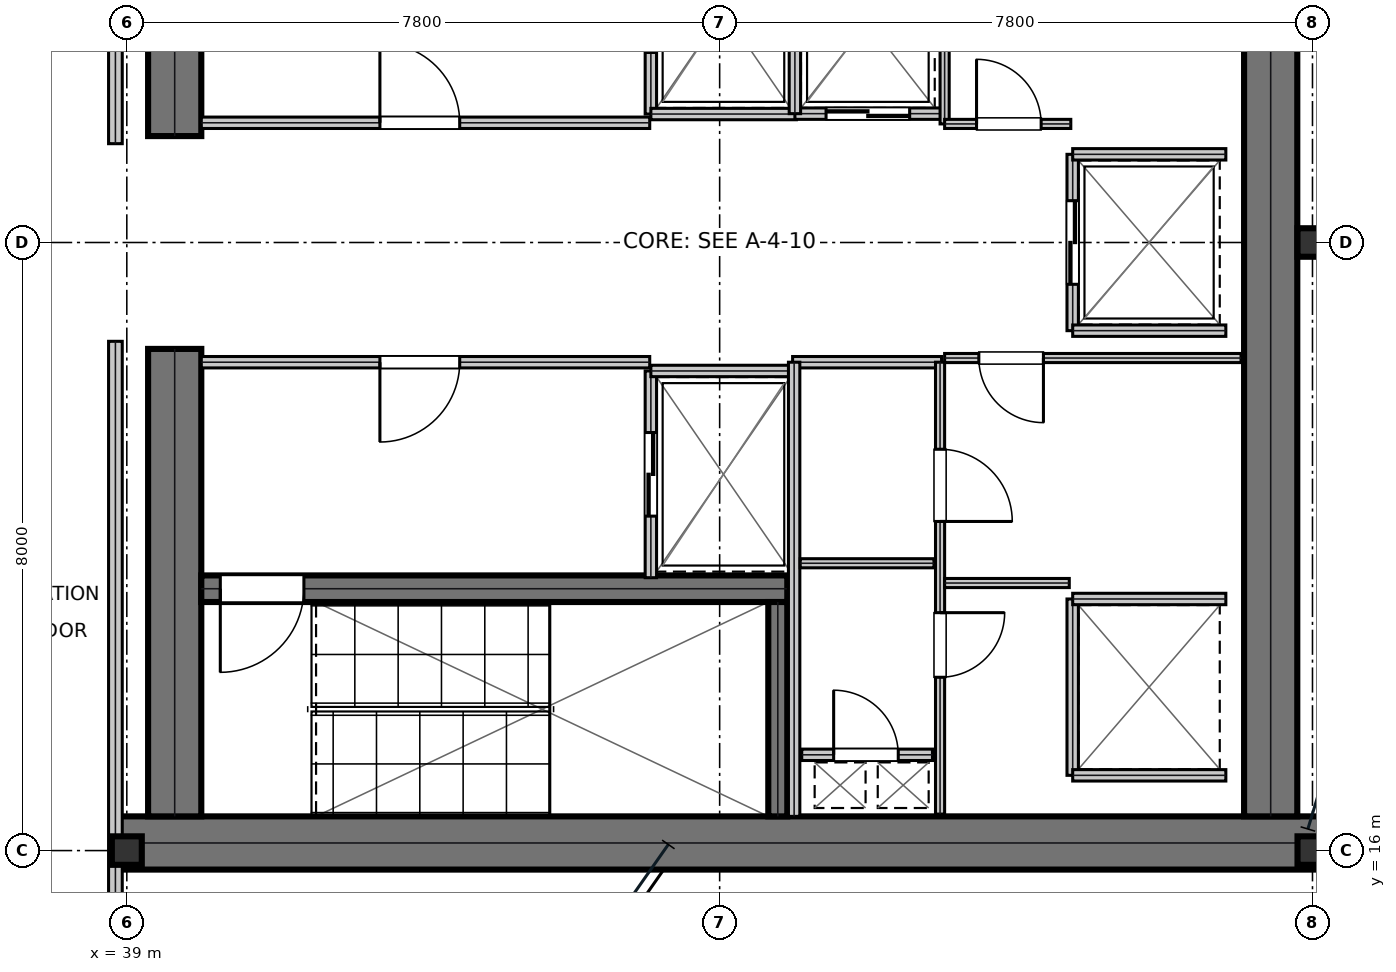
"""IFC4 building model, lengths in metres.
Left out: names, types, materials, properties, quantities, classifications, styles, units other than length and angle.
Written with IfcOpenShell. Run it as: python <this file> out.ifc"""

import sys

from ifc_helpers import new_model, si_unit, direction, frame, frame_2d, origin, origin_2d, place, context, subcontext, project, spatial, rectangle, i_section, extrude, element, fill, save


model = new_model("IFC4")
c1 = context("Model", 3, precision=1e-05, world=origin(), true_north=direction((0.0, 1.0)))
c2 = subcontext(c1, "Body", "Model", "MODEL_VIEW")
j1 = project(units=[si_unit("LENGTHUNIT", "METRE"), si_unit("PLANEANGLEUNIT", "RADIAN")], contexts=[c1])
p1 = place(None, origin())
s1 = spatial("IfcSite", under=j1, at=p1, CompositionType="ELEMENT")
p2 = place(p1, origin())
s2 = spatial("IfcBuilding", under=s1, at=p2, CompositionType="ELEMENT")
p3 = place(p2, frame((0.0, 0.0, 224.25)))
s3 = spatial("IfcBuildingStorey", under=s2, at=p3, CompositionType="ELEMENT", Elevation=224.25)
p4 = place(p3, frame((38.8, 16.1, 0.0), z_axis=(0.0, 0.0, 1.0), x_axis=(1.0, 0.0, 0.0)))
e1 = element("IfcWall", 1, at=p4, inside=s3, PredefinedType="SHEAR", context=c2, shape_type="SweptSolid", body=[
    extrude(rectangle(XDim=16.0, YDim=0.7, at=frame_2d((8.0, 0.0))), origin(), (0.0, 0.0, 1.0), 3.79),
])
for number, where, z_axis, x_axis in (
    (2, (39.63, 16.45, 0.0), (0.0, 0.0, 1.0), (0.0, 1.0, 0.0)),
    (3, (39.63, 25.4, 0.0), (0.0, 0.0, 1.0), (0.0, 1.0, 0.0)),
):
    element("IfcWall", number, at=place(p3, frame(where, z_axis=z_axis, x_axis=x_axis)), inside=s3, PredefinedType="SHEAR", context=c2, shape_type="SweptSolid", body=[
        extrude(rectangle(XDim=6.15, YDim=0.7, at=frame_2d((3.075, 0.0))), origin(), (0.0, 0.0, 1.0), 3.79),
    ])
p5 = place(p3, frame((54.05, 16.45, 0.0), z_axis=(0.0, 0.0, 1.0), x_axis=(0.0, 1.0, 0.0)))
e4 = element("IfcWall", 4, at=p5, inside=s3, PredefinedType="SHEAR", context=c2, shape_type="SweptSolid", body=[
    extrude(rectangle(XDim=15.1, YDim=0.7, at=frame_2d((7.55, 0.0))), origin(), (0.0, 0.0, 1.0), 3.79),
])
p6 = place(p3, frame((39.98, 19.445, 0.0), z_axis=(0.0, 0.0, 1.0), x_axis=(1.0, 0.0, 0.0)))
e5 = element("IfcWall", 5, at=p6, inside=s3, PredefinedType="SHEAR", context=c2, shape_type="SweptSolid", body=[
    extrude(rectangle(XDim=7.71, YDim=0.35, at=frame_2d((3.855, 0.0))), origin(), (0.0, 0.0, 1.0), 3.79),
])
p7 = place(p6, frame((0.25, 0.0, 0.0)))
e6 = element("IfcOpeningElement", 6, at=p7, cuts=e5, PredefinedType="OPENING", context=c2, shape_type="SweptSolid", body=[
    extrude(rectangle(XDim=1.1, YDim=2.15, at=frame_2d((0.55, 1.075))), frame((0.0, 0.185, 0.0), z_axis=(0.0, -1.0, 0.0), x_axis=(1.0, 0.0, 0.0)), (0.0, 0.0, 1.0), 0.37),
])
p8 = place(p3, frame((47.565, 16.45, 0.0), z_axis=(0.0, 0.0, 1.0), x_axis=(0.0, 1.0, 0.0)))
e7 = element("IfcWall", 7, at=p8, inside=s3, PredefinedType="SHEAR", context=c2, shape_type="SweptSolid", body=[
    extrude(rectangle(XDim=2.82, YDim=0.25, at=frame_2d((1.41, 0.0))), origin(), (0.0, 0.0, 1.0), 3.79),
])
for number, where, z_axis, x_axis in (
    (8, (39.0, 16.0, 0.0), (0.0, 0.0, 1.0), (1.0, 0.0, 0.0)),
    (9, (54.6, 16.0, 0.0), (0.0, 0.0, 1.0), (1.0, 0.0, 0.0)),
    (10, (54.6, 24.0, 0.0), (0.0, 0.0, 1.0), (1.0, 0.0, 0.0)),
):
    element("IfcColumn", number, at=place(p3, frame(where, z_axis=z_axis, x_axis=x_axis)), inside=s3, PredefinedType="COLUMN", context=c2, shape_type="SweptSolid", body=[
        extrude(i_section(OverallWidth=0.394, OverallDepth=0.375, WebThickness=0.017, FlangeThickness=0.028, at=origin_2d()), origin(), (0.0, 0.0, 1.0), 4.044),
    ])
p9 = place(p3, frame((39.98, 25.575, 0.0), z_axis=(0.0, 0.0, 1.0), x_axis=(1.0, 0.0, 0.0)))
e11 = element("IfcWall", 11, at=p9, inside=s3, PredefinedType="PARTITIONING", context=c2, shape_type="SweptSolid", body=[
    extrude(rectangle(XDim=5.9, YDim=0.15, at=frame_2d((2.95, 0.0))), origin(), (0.0, 0.0, 1.0), 3.79),
])
p10 = place(p9, frame((2.35, 0.0, 0.0)))
e12 = element("IfcOpeningElement", 12, at=p10, cuts=e11, PredefinedType="OPENING", context=c2, shape_type="SweptSolid", body=[
    extrude(rectangle(XDim=1.05, YDim=2.15, at=frame_2d((0.525, 1.075))), frame((0.0, 0.085, 0.0), z_axis=(0.0, -1.0, 0.0), x_axis=(1.0, 0.0, 0.0)), (0.0, 0.0, 1.0), 0.17),
])
p11 = place(p3, frame((39.98, 22.425, 0.0), z_axis=(0.0, 0.0, 1.0), x_axis=(1.0, 0.0, 0.0)))
e13 = element("IfcWall", 13, at=p11, inside=s3, PredefinedType="PARTITIONING", context=c2, shape_type="SweptSolid", body=[
    extrude(rectangle(XDim=5.9, YDim=0.15, at=frame_2d((2.95, 0.0))), origin(), (0.0, 0.0, 1.0), 3.79),
])
p12 = place(p11, frame((2.35, 0.0, 0.0)))
e14 = element("IfcOpeningElement", 14, at=p12, cuts=e13, PredefinedType="OPENING", context=c2, shape_type="SweptSolid", body=[
    extrude(rectangle(XDim=1.05, YDim=2.15, at=frame_2d((0.525, 1.075))), frame((0.0, 0.085, 0.0), z_axis=(0.0, -1.0, 0.0), x_axis=(1.0, 0.0, 0.0)), (0.0, 0.0, 1.0), 0.17),
])
p13 = place(p3, frame((45.895, 25.69, 0.0), z_axis=(0.0, 0.0, 1.0), x_axis=(0.0, 1.0, 0.0)))
e15 = element("IfcWall", 15, at=p13, inside=s3, PredefinedType="PARTITIONING", context=c2, shape_type="SweptSolid", body=[
    extrude(rectangle(XDim=2.72, YDim=0.15, at=frame_2d((1.36, 0.0))), origin(), (0.0, 0.0, 1.0), 3.79),
])
p14 = place(p13, frame((0.81, 0.0, 0.0)))
e16 = element("IfcOpeningElement", 16, at=p14, cuts=e15, PredefinedType="OPENING", context=c2, shape_type="SweptSolid", body=[
    extrude(rectangle(XDim=1.1, YDim=2.15, at=frame_2d((0.55, 1.075))), frame((0.0, 0.085, 0.0), z_axis=(0.0, -1.0, 0.0), x_axis=(1.0, 0.0, 0.0)), (0.0, 0.0, 1.0), 0.17),
])
p15 = place(p3, frame((45.895, 25.69, 0.0), z_axis=(0.0, 0.0, 1.0), x_axis=(1.0, 0.0, 0.0)))
e17 = element("IfcWall", 17, at=p15, inside=s3, PredefinedType="PARTITIONING", context=c2, shape_type="SweptSolid", body=[
    extrude(rectangle(XDim=1.915, YDim=0.15, at=frame_2d((0.958, 0.0))), origin(), (0.0, 0.0, 1.0), 3.79),
])
p16 = place(p3, frame((45.895, 19.59, 0.0), z_axis=(0.0, 0.0, 1.0), x_axis=(0.0, 1.0, 0.0)))
e18 = element("IfcWall", 18, at=p16, inside=s3, PredefinedType="PARTITIONING", context=c2, shape_type="SweptSolid", body=[
    extrude(rectangle(XDim=2.72, YDim=0.15, at=frame_2d((1.36, 0.0))), origin(), (0.0, 0.0, 1.0), 3.79),
])
p17 = place(p16, frame((0.81, 0.0, 0.0)))
e19 = element("IfcOpeningElement", 19, at=p17, cuts=e18, PredefinedType="OPENING", context=c2, shape_type="SweptSolid", body=[
    extrude(rectangle(XDim=1.1, YDim=2.15, at=frame_2d((0.55, 1.075))), frame((0.0, 0.085, 0.0), z_axis=(0.0, -1.0, 0.0), x_axis=(1.0, 0.0, 0.0)), (0.0, 0.0, 1.0), 0.17),
])
p18 = place(p3, frame((45.895, 22.31, 0.0), z_axis=(0.0, 0.0, 1.0), x_axis=(1.0, 0.0, 0.0)))
e20 = element("IfcWall", 20, at=p18, inside=s3, PredefinedType="PARTITIONING", context=c2, shape_type="SweptSolid", body=[
    extrude(rectangle(XDim=1.915, YDim=0.15, at=frame_2d((0.958, 0.0))), origin(), (0.0, 0.0, 1.0), 3.79),
])
p19 = place(p3, frame((47.79, 25.695, 0.0), z_axis=(0.0, 0.0, 1.0), x_axis=(1.0, 0.0, 0.0)))
e21 = element("IfcWall", 21, at=p19, inside=s3, PredefinedType="PARTITIONING", context=c2, shape_type="SweptSolid", body=[
    extrude(rectangle(XDim=1.92, YDim=0.15, at=frame_2d((0.96, 0.0))), origin(), (0.0, 0.0, 1.0), 3.79),
])
p20 = place(p19, frame((0.41, 0.0, 0.0)))
e22 = element("IfcOpeningElement", 22, at=p20, cuts=e21, PredefinedType="OPENING", context=c2, shape_type="SweptSolid", body=[
    extrude(rectangle(XDim=1.1, YDim=2.15, at=frame_2d((0.55, 1.075))), frame((0.0, 0.085, 0.0), z_axis=(0.0, -1.0, 0.0), x_axis=(1.0, 0.0, 0.0)), (0.0, 0.0, 1.0), 0.17),
])
p21 = place(p3, frame((47.79, 25.695, 0.0), z_axis=(0.0, 0.0, 1.0), x_axis=(0.0, 1.0, 0.0)))
e23 = element("IfcWall", 23, at=p21, inside=s3, PredefinedType="PARTITIONING", context=c2, shape_type="SweptSolid", body=[
    extrude(rectangle(XDim=2.415, YDim=0.15, at=frame_2d((1.208, 0.0))), origin(), (0.0, 0.0, 1.0), 3.79),
])
p22 = place(p3, frame((51.445, 22.84, 0.0), z_axis=(0.0, 0.0, 1.0), x_axis=(0.0, 1.0, 0.0)))
e24 = element("IfcWall", 24, at=p22, inside=s3, PredefinedType="PARTITIONING", context=c2, shape_type="SweptSolid", body=[
    extrude(rectangle(XDim=2.32, YDim=0.15, at=frame_2d((1.16, 0.0))), origin(), (0.0, 0.0, 1.0), 3.79),
])
p23 = place(p22, frame((0.61, 0.0, 0.0)))
e25 = element("IfcOpeningElement", 25, at=p23, cuts=e24, PredefinedType="OPENING", context=c2, shape_type="SweptSolid", body=[
    extrude(rectangle(XDim=1.1, YDim=2.15, at=frame_2d((0.55, 1.075))), frame((0.0, 0.085, 0.0), z_axis=(0.0, -1.0, 0.0), x_axis=(1.0, 0.0, 0.0)), (0.0, 0.0, 1.0), 0.17),
])
for number, where, z_axis, x_axis in (
    (26, (51.445, 22.84, 0.0), (0.0, 0.0, 1.0), (1.0, 0.0, 0.0)),
    (27, (51.445, 25.16, 0.0), (0.0, 0.0, 1.0), (1.0, 0.0, 0.0)),
):
    element("IfcWall", number, at=place(p3, frame(where, z_axis=z_axis, x_axis=x_axis)), inside=s3, PredefinedType="PARTITIONING", context=c2, shape_type="SweptSolid", body=[
        extrude(rectangle(XDim=2.015, YDim=0.15, at=frame_2d((1.007, 0.0))), origin(), (0.0, 0.0, 1.0), 3.79),
    ])
p24 = place(p3, frame((51.445, 16.99, 0.0), z_axis=(0.0, 0.0, 1.0), x_axis=(0.0, 1.0, 0.0)))
e28 = element("IfcWall", 28, at=p24, inside=s3, PredefinedType="PARTITIONING", context=c2, shape_type="SweptSolid", body=[
    extrude(rectangle(XDim=2.32, YDim=0.15, at=frame_2d((1.16, 0.0))), origin(), (0.0, 0.0, 1.0), 3.79),
])
for number, where, z_axis, x_axis in (
    (29, (51.445, 16.99, 0.0), (0.0, 0.0, 1.0), (1.0, 0.0, 0.0)),
    (30, (51.445, 19.31, 0.0), (0.0, 0.0, 1.0), (1.0, 0.0, 0.0)),
):
    element("IfcWall", number, at=place(p3, frame(where, z_axis=z_axis, x_axis=x_axis)), inside=s3, PredefinedType="PARTITIONING", context=c2, shape_type="SweptSolid", body=[
        extrude(rectangle(XDim=2.015, YDim=0.15, at=frame_2d((1.007, 0.0))), origin(), (0.0, 0.0, 1.0), 3.79),
    ])
p25 = place(p3, frame((47.88, 17.26, 0.0), z_axis=(0.0, 0.0, 1.0), x_axis=(1.0, 0.0, 0.0)))
e31 = element("IfcWall", 31, at=p25, inside=s3, PredefinedType="PARTITIONING", context=c2, shape_type="SweptSolid", body=[
    extrude(rectangle(XDim=1.72, YDim=0.15, at=frame_2d((0.86, 0.0))), origin(), (0.0, 0.0, 1.0), 3.79),
])
p26 = place(p25, frame((0.42, 0.0, 0.0)))
e32 = element("IfcOpeningElement", 32, at=p26, cuts=e31, PredefinedType="OPENING", context=c2, shape_type="SweptSolid", body=[
    extrude(rectangle(XDim=0.85, YDim=2.15, at=frame_2d((0.425, 1.075))), frame((0.0, 0.085, 0.0), z_axis=(0.0, -1.0, 0.0), x_axis=(1.0, 0.0, 0.0)), (0.0, 0.0, 1.0), 0.17),
])
p27 = place(p3, frame((47.76, 22.425, 0.0), z_axis=(0.0, 0.0, 1.0), x_axis=(1.0, 0.0, 0.0)))
e33 = element("IfcWall", 33, at=p27, inside=s3, PredefinedType="PARTITIONING", context=c2, shape_type="SweptSolid", body=[
    extrude(rectangle(XDim=1.96, YDim=0.15, at=frame_2d((0.98, 0.0))), origin(), (0.0, 0.0, 1.0), 3.79),
])
p28 = place(p3, frame((47.78, 16.45, 0.0), z_axis=(0.0, 0.0, 1.0), x_axis=(0.0, 1.0, 0.0)))
e34 = element("IfcWall", 34, at=p28, inside=s3, PredefinedType="PARTITIONING", context=c2, shape_type="SweptSolid", body=[
    extrude(rectangle(XDim=5.975, YDim=0.15, at=frame_2d((2.988, 0.0))), origin(), (0.0, 0.0, 1.0), 3.79),
])
p29 = place(p3, frame((47.86, 19.78, 0.0), z_axis=(0.0, 0.0, 1.0), x_axis=(1.0, 0.0, 0.0)))
e35 = element("IfcWall", 35, at=p29, inside=s3, PredefinedType="PARTITIONING", context=c2, shape_type="SweptSolid", body=[
    extrude(rectangle(XDim=1.76, YDim=0.12, at=frame_2d((0.88, 0.0))), origin(), (0.0, 0.0, 1.0), 3.79),
])
p30 = place(p3, frame((49.7, 16.48, 0.0), z_axis=(0.0, 0.0, 1.0), x_axis=(0.0, 1.0, 0.0)))
e36 = element("IfcWall", 36, at=p30, inside=s3, PredefinedType="PARTITIONING", context=c2, shape_type="SweptSolid", body=[
    extrude(rectangle(XDim=5.945, YDim=0.12, at=frame_2d((2.973, 0.0))), origin(), (0.0, 0.0, 1.0), 3.79),
])
p31 = place(p30, frame((1.8, 0.0, 0.0)))
e37 = element("IfcOpeningElement", 37, at=p31, cuts=e36, PredefinedType="OPENING", context=c2, shape_type="SweptSolid", body=[
    extrude(rectangle(XDim=0.85, YDim=2.15, at=frame_2d((0.425, 1.075))), frame((0.0, 0.07, 0.0), z_axis=(0.0, -1.0, 0.0), x_axis=(1.0, 0.0, 0.0)), (0.0, 0.0, 1.0), 0.14),
])
p32 = place(p30, frame((3.85, 0.0, 0.0)))
e38 = element("IfcOpeningElement", 38, at=p32, cuts=e36, PredefinedType="OPENING", context=c2, shape_type="SweptSolid", body=[
    extrude(rectangle(XDim=0.95, YDim=2.15, at=frame_2d((0.475, 1.075))), frame((0.0, 0.07, 0.0), z_axis=(0.0, -1.0, 0.0), x_axis=(1.0, 0.0, 0.0)), (0.0, 0.0, 1.0), 0.14),
])
p33 = place(p3, frame((49.76, 22.48, 0.0), z_axis=(0.0, 0.0, 1.0), x_axis=(1.0, 0.0, 0.0)))
e39 = element("IfcWall", 39, at=p33, inside=s3, PredefinedType="PARTITIONING", context=c2, shape_type="SweptSolid", body=[
    extrude(rectangle(XDim=3.9, YDim=0.12, at=frame_2d((1.95, 0.0))), origin(), (0.0, 0.0, 1.0), 3.79),
])
p34 = place(p33, frame((0.45, 0.0, 0.0)))
e40 = element("IfcOpeningElement", 40, at=p34, cuts=e39, PredefinedType="OPENING", context=c2, shape_type="SweptSolid", body=[
    extrude(rectangle(XDim=0.85, YDim=2.15, at=frame_2d((0.425, 1.075))), frame((0.0, 0.07, 0.0), z_axis=(0.0, -1.0, 0.0), x_axis=(1.0, 0.0, 0.0)), (0.0, 0.0, 1.0), 0.14),
])
p35 = place(p3, frame((49.76, 19.52, 0.0), z_axis=(0.0, 0.0, 1.0), x_axis=(1.0, 0.0, 0.0)))
e41 = element("IfcWall", 41, at=p35, inside=s3, PredefinedType="PARTITIONING", context=c2, shape_type="SweptSolid", body=[
    extrude(rectangle(XDim=1.64, YDim=0.12, at=frame_2d((0.82, 0.0))), origin(), (0.0, 0.0, 1.0), 3.79),
])
p36 = place(p3, frame((49.76, 25.56, 0.0), z_axis=(0.0, 0.0, 1.0), x_axis=(0.0, 1.0, 0.0)))
e42 = element("IfcWall", 42, at=p36, inside=s3, PredefinedType="PARTITIONING", context=c2, shape_type="SweptSolid", body=[
    extrude(rectangle(XDim=2.66, YDim=0.12, at=frame_2d((1.33, 0.0))), origin(), (0.0, 0.0, 1.0), 3.79),
])
p37 = place(p3, frame((49.76, 25.56, 0.0), z_axis=(0.0, 0.0, 1.0), x_axis=(1.0, 0.0, 0.0)))
e43 = element("IfcWall", 43, at=p37, inside=s3, PredefinedType="PARTITIONING", context=c2, shape_type="SweptSolid", body=[
    extrude(rectangle(XDim=1.66, YDim=0.12, at=frame_2d((0.83, 0.0))), origin(), (0.0, 0.0, 1.0), 3.79),
])
p38 = place(p37, frame((0.42, 0.0, 0.0)))
e44 = element("IfcOpeningElement", 44, at=p38, cuts=e43, PredefinedType="OPENING", context=c2, shape_type="SweptSolid", body=[
    extrude(rectangle(XDim=0.85, YDim=2.15, at=frame_2d((0.425, 1.075))), frame((0.0, 0.07, 0.0), z_axis=(0.0, -1.0, 0.0), x_axis=(1.0, 0.0, 0.0)), (0.0, 0.0, 1.0), 0.14),
])
p39 = place(p3, frame((38.85, 14.707, 0.0), z_axis=(0.0, 0.0, 1.0), x_axis=(0.0, 1.0, 0.0)))
e45 = element("IfcWall", 45, at=p39, inside=s3, PredefinedType="SOLIDWALL", context=c2, shape_type="SweptSolid", body=[
    extrude(rectangle(XDim=7.993, YDim=0.18, at=frame_2d((3.997, 0.0))), origin(), (0.0, 0.0, 1.0), 3.241),
])
p40 = place(p3, frame((38.85, 25.3, 0.0), z_axis=(0.0, 0.0, 1.0), x_axis=(0.0, 1.0, 0.0)))
e46 = element("IfcWall", 46, at=p40, inside=s3, PredefinedType="SOLIDWALL", context=c2, shape_type="SweptSolid", body=[
    extrude(rectangle(XDim=8.2, YDim=0.18, at=frame_2d((4.1, 0.0))), origin(), (0.0, 0.0, 1.0), 3.241),
])
p41 = place(p10, origin())
e47 = element("IfcDoor", 47, at=p41, inside=s3, OperationType="SINGLE_SWING_LEFT", PredefinedType="DOOR", context=c2, shape_type="SweptSolid", body=[
    extrude(rectangle(XDim=1.05, YDim=2.15, at=frame_2d((0.525, 1.075))), frame((0.0, 0.025, 0.0), z_axis=(0.0, -1.0, 0.0), x_axis=(1.0, 0.0, 0.0)), (0.0, 0.0, 1.0), 0.05),
])
fill(e12, e47)
p42 = place(p12, frame((1.05, 0.0, 0.0), z_axis=(0.0, 0.0, 1.0), x_axis=(-1.0, 0.0, 0.0)))
e48 = element("IfcDoor", 48, at=p42, inside=s3, OperationType="SINGLE_SWING_RIGHT", PredefinedType="DOOR", context=c2, shape_type="SweptSolid", body=[
    extrude(rectangle(XDim=1.05, YDim=2.15, at=frame_2d((0.525, 1.075))), frame((0.0, 0.025, 0.0), z_axis=(0.0, -1.0, 0.0), x_axis=(1.0, 0.0, 0.0)), (0.0, 0.0, 1.0), 0.05),
])
fill(e14, e48)
p43 = place(p17, frame((1.1, 0.0, 0.0), z_axis=(0.0, 0.0, 1.0), x_axis=(-1.0, 0.0, 0.0)))
e49 = element("IfcDoor", 49, at=p43, inside=s3, OperationType="DOUBLE_DOOR_SLIDING", PredefinedType="DOOR", context=c2, shape_type="SweptSolid", body=[
    extrude(rectangle(XDim=1.1, YDim=2.15, at=frame_2d((0.55, 1.075))), frame((0.0, 0.025, 0.0), z_axis=(0.0, -1.0, 0.0), x_axis=(1.0, 0.0, 0.0)), (0.0, 0.0, 1.0), 0.05),
])
fill(e19, e49)
p44 = place(p20, frame((1.1, 0.0, 0.0), z_axis=(0.0, 0.0, 1.0), x_axis=(-1.0, 0.0, 0.0)))
e50 = element("IfcDoor", 50, at=p44, inside=s3, OperationType="DOUBLE_DOOR_SLIDING", PredefinedType="DOOR", context=c2, shape_type="SweptSolid", body=[
    extrude(rectangle(XDim=1.1, YDim=2.15, at=frame_2d((0.55, 1.075))), frame((0.0, 0.025, 0.0), z_axis=(0.0, -1.0, 0.0), x_axis=(1.0, 0.0, 0.0)), (0.0, 0.0, 1.0), 0.05),
])
fill(e22, e50)
p45 = place(p23, frame((1.1, 0.0, 0.0), z_axis=(0.0, 0.0, 1.0), x_axis=(-1.0, 0.0, 0.0)))
e51 = element("IfcDoor", 51, at=p45, inside=s3, OperationType="DOUBLE_DOOR_SLIDING", PredefinedType="DOOR", context=c2, shape_type="SweptSolid", body=[
    extrude(rectangle(XDim=1.1, YDim=2.15, at=frame_2d((0.55, 1.075))), frame((0.0, 0.025, 0.0), z_axis=(0.0, -1.0, 0.0), x_axis=(1.0, 0.0, 0.0)), (0.0, 0.0, 1.0), 0.05),
])
fill(e25, e51)
p46 = place(p26, origin())
e52 = element("IfcDoor", 52, at=p46, inside=s3, OperationType="SINGLE_SWING_LEFT", PredefinedType="TRAPDOOR", context=c2, shape_type="SweptSolid", body=[
    extrude(rectangle(XDim=0.85, YDim=2.15, at=frame_2d((0.425, 1.075))), frame((0.0, 0.025, 0.0), z_axis=(0.0, -1.0, 0.0), x_axis=(1.0, 0.0, 0.0)), (0.0, 0.0, 1.0), 0.05),
])
fill(e32, e52)
p47 = place(p31, frame((0.85, 0.0, 0.0), z_axis=(0.0, 0.0, 1.0), x_axis=(-1.0, 0.0, 0.0)))
e53 = element("IfcDoor", 53, at=p47, inside=s3, OperationType="SINGLE_SWING_LEFT", PredefinedType="DOOR", context=c2, shape_type="SweptSolid", body=[
    extrude(rectangle(XDim=0.85, YDim=2.15, at=frame_2d((0.425, 1.075))), frame((0.0, 0.025, 0.0), z_axis=(0.0, -1.0, 0.0), x_axis=(1.0, 0.0, 0.0)), (0.0, 0.0, 1.0), 0.05),
])
fill(e37, e53)
p48 = place(p32, frame((0.95, 0.0, 0.0), z_axis=(0.0, 0.0, 1.0), x_axis=(-1.0, 0.0, 0.0)))
e54 = element("IfcDoor", 54, at=p48, inside=s3, OperationType="SINGLE_SWING_RIGHT", PredefinedType="DOOR", context=c2, shape_type="SweptSolid", body=[
    extrude(rectangle(XDim=0.95, YDim=2.15, at=frame_2d((0.475, 1.075))), frame((0.0, 0.025, 0.0), z_axis=(0.0, -1.0, 0.0), x_axis=(1.0, 0.0, 0.0)), (0.0, 0.0, 1.0), 0.05),
])
fill(e38, e54)
p49 = place(p34, frame((0.85, 0.0, 0.0), z_axis=(0.0, 0.0, 1.0), x_axis=(-1.0, 0.0, 0.0)))
e55 = element("IfcDoor", 55, at=p49, inside=s3, OperationType="SINGLE_SWING_LEFT", PredefinedType="DOOR", context=c2, shape_type="SweptSolid", body=[
    extrude(rectangle(XDim=0.85, YDim=2.15, at=frame_2d((0.425, 1.075))), frame((0.0, 0.025, 0.0), z_axis=(0.0, -1.0, 0.0), x_axis=(1.0, 0.0, 0.0)), (0.0, 0.0, 1.0), 0.05),
])
fill(e40, e55)
p50 = place(p38, origin())
e56 = element("IfcDoor", 56, at=p50, inside=s3, OperationType="SINGLE_SWING_LEFT", PredefinedType="DOOR", context=c2, shape_type="SweptSolid", body=[
    extrude(rectangle(XDim=0.85, YDim=2.15, at=frame_2d((0.425, 1.075))), frame((0.0, 0.025, 0.0), z_axis=(0.0, -1.0, 0.0), x_axis=(1.0, 0.0, 0.0)), (0.0, 0.0, 1.0), 0.05),
])
fill(e44, e56)
p51 = place(p7, frame((1.1, 0.0, 0.0), z_axis=(0.0, 0.0, 1.0), x_axis=(-1.0, 0.0, 0.0)))
e57 = element("IfcDoor", 57, at=p51, inside=s3, OperationType="SINGLE_SWING_RIGHT", PredefinedType="DOOR", context=c2, shape_type="SweptSolid", body=[
    extrude(rectangle(XDim=1.1, YDim=2.15, at=frame_2d((0.55, 1.075))), frame((0.0, 0.025, 0.0), z_axis=(0.0, -1.0, 0.0), x_axis=(1.0, 0.0, 0.0)), (0.0, 0.0, 1.0), 0.05),
])
fill(e6, e57)
save(model, sys.argv[1])
